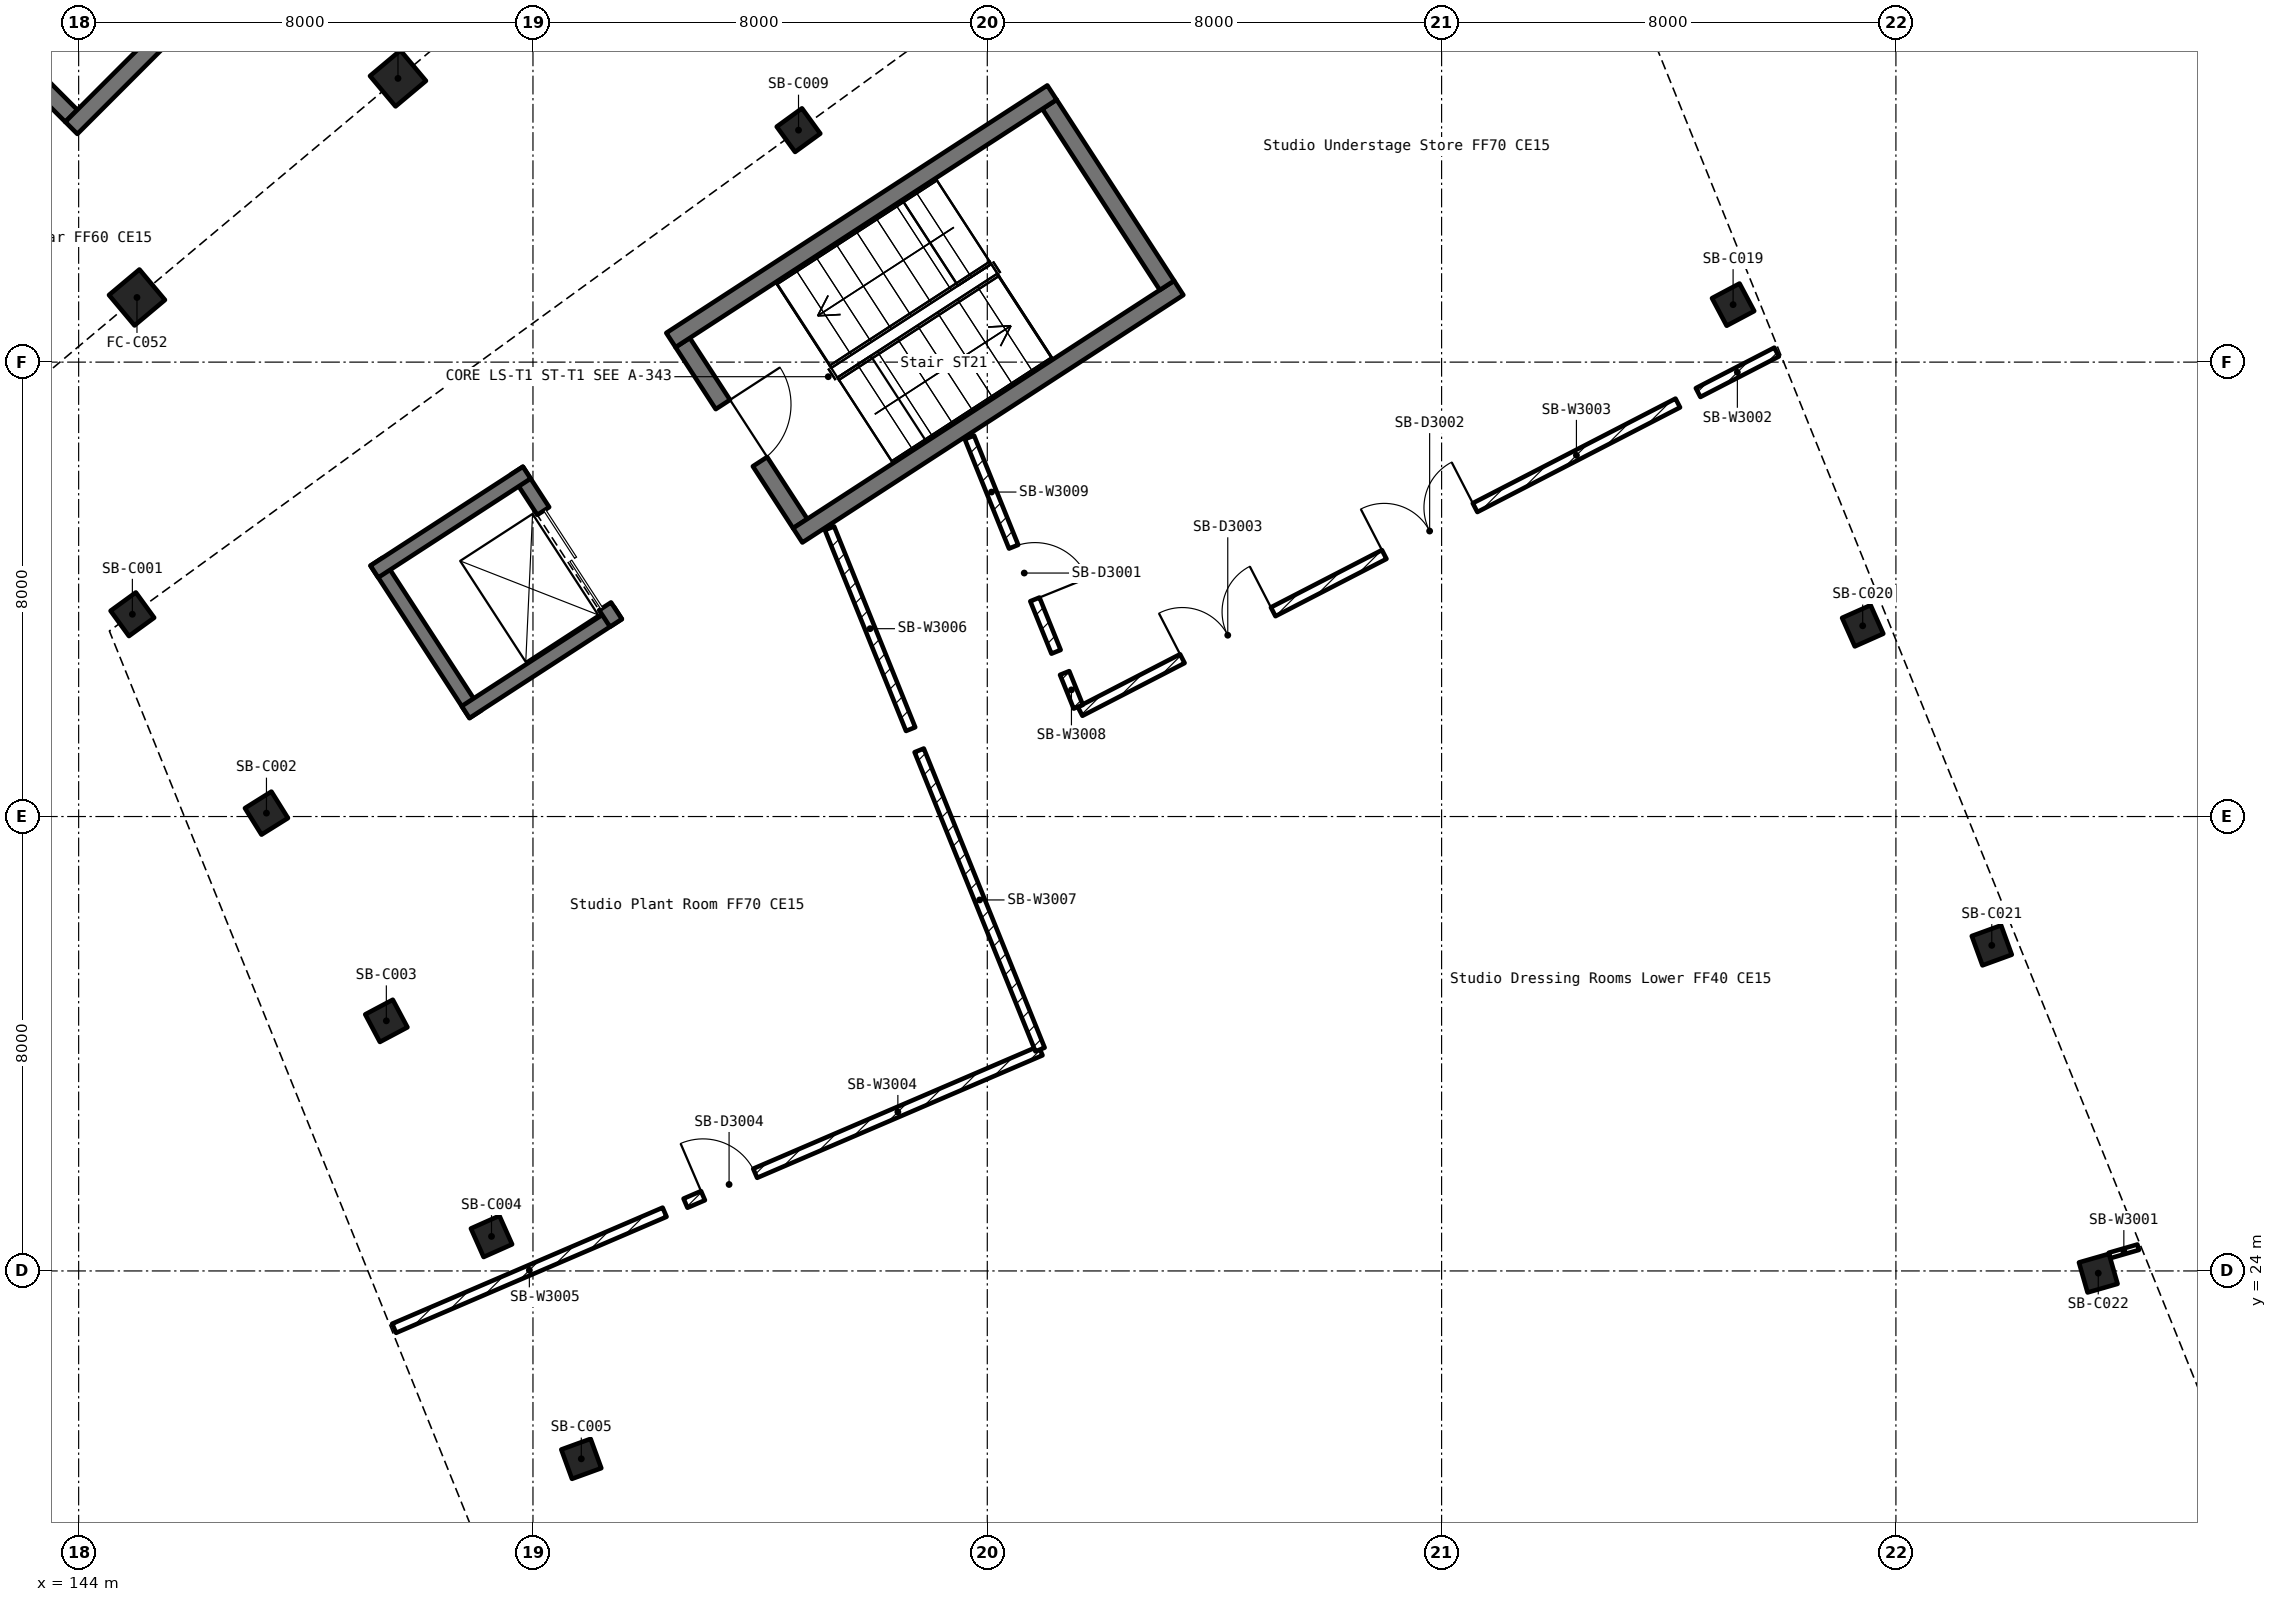
"""IFC4 building model, lengths in metres.
Left out: names, types, materials, properties, quantities, classifications, styles, units other than length and angle.
Written with IfcOpenShell. Run it as: python <this file> out.ifc"""

import sys

from ifc_helpers import new_model, si_unit, direction, frame, frame_2d, origin, origin_2d, place, context, subcontext, project, spatial, rectangle, extrude, element, fill, save


model = new_model("IFC4")
c1 = context("Model", 3, precision=1e-05, world=origin(), true_north=direction((0.0, 1.0)))
c2 = subcontext(c1, "Body", "Model", "MODEL_VIEW")
j1 = project(units=[si_unit("LENGTHUNIT", "METRE"), si_unit("PLANEANGLEUNIT", "RADIAN")], contexts=[c1])
p1 = place(None, origin())
s1 = spatial("IfcSite", under=j1, at=p1, CompositionType="ELEMENT")
p2 = place(p1, origin())
s2 = spatial("IfcBuilding", under=s1, at=p2, CompositionType="ELEMENT")
p3 = place(p2, frame((0.0, 0.0, -6.0)))
s3 = spatial("IfcBuildingStorey", under=s2, at=p3, CompositionType="ELEMENT", Elevation=-6.0)
for number, where, z_axis, x_axis in (
    (1, (145.027, 41.138, 0.0), (0.0, 0.0, 1.0), (0.643, -0.766, 0.0)),
    (2, (149.623, 44.995, 0.0), (0.0, 0.0, 1.0), (0.643, -0.766, 0.0)),
):
    element("IfcColumn", number, at=place(p3, frame(where, z_axis=z_axis, x_axis=x_axis)), inside=s3, PredefinedType="COLUMN", context=c2, shape_type="SweptSolid", body=[
        extrude(rectangle(XDim=0.7, YDim=0.7, at=origin_2d()), origin(), (0.0, 0.0, 1.0), 6.0),
    ])
for number, where, z_axis, x_axis in (
    (3, (144.946, 35.561, 0.0), (0.0, 0.0, 1.0), (0.588, -0.809, 0.0)),
    (4, (147.307, 32.06, 0.0), (0.0, 0.0, 1.0), (0.53, -0.848, 0.0)),
    (5, (149.418, 28.403, 0.0), (0.0, 0.0, 1.0), (0.469, -0.883, 0.0)),
    (6, (151.27, 24.608, 0.0), (0.0, 0.0, 1.0), (0.407, -0.914, 0.0)),
    (7, (152.851, 20.692, 0.0), (0.0, 0.0, 1.0), (0.342, -0.94, 0.0)),
    (8, (156.676, 44.084, 0.0), (0.0, 0.0, 1.0), (0.588, -0.809, 0.0)),
    (9, (173.133, 41.012, 0.0), (0.0, 0.0, 1.0), (0.469, -0.883, 0.0)),
    (10, (175.415, 35.358, 0.0), (0.0, 0.0, 1.0), (0.407, -0.914, 0.0)),
    (11, (177.688, 29.732, 0.0), (0.0, 0.0, 1.0), (0.342, -0.94, 0.0)),
    (12, (179.563, 23.961, 0.0), (0.0, 0.0, 1.0), (0.276, -0.961, 0.0)),
):
    element("IfcColumn", number, at=place(p3, frame(where, z_axis=z_axis, x_axis=x_axis)), inside=s3, PredefinedType="COLUMN", context=c2, shape_type="SweptSolid", body=[
        extrude(rectangle(XDim=0.55, YDim=0.55, at=origin_2d()), origin(), (0.0, 0.0, 1.0), 6.0),
    ])
p4 = place(p2, origin())
s4 = spatial("IfcBuildingStorey", under=s2, at=p4, CompositionType="ELEMENT", Elevation=0.0)
p5 = place(p4, frame((171.933, 40.375, -6.3), z_axis=(0.0, 0.0, 1.0), x_axis=(-0.882926128241, -0.469511929634, 0.0)))
e13 = element("IfcWall", 13, at=p5, inside=s4, PredefinedType="SHEAR", context=c2, shape_type="SweptSolid", body=[
    extrude(rectangle(XDim=22.0, YDim=0.4, at=frame_2d((11.0, 0.0))), origin(), (0.0, 0.0, 1.0), 12.3),
])
p6 = place(p4, frame((152.509, 30.046, -6.3), z_axis=(0.0, 0.0, 1.0), x_axis=(0.374613299166, -0.92718114524, 0.0)))
e14 = element("IfcWall", 14, at=p6, inside=s4, PredefinedType="SHEAR", context=c2, shape_type="SweptSolid", body=[
    extrude(rectangle(XDim=13.379, YDim=0.4, at=frame_2d((6.689, 0.0))), origin(), (0.0, 0.0, 1.0), 12.3),
])
p7 = place(p6, frame((6.191, 0.0, 6.3)))
e15 = element("IfcOpeningElement", 15, at=p7, cuts=e14, PredefinedType="OPENING", context=c2, shape_type="SweptSolid", body=[
    extrude(rectangle(XDim=1.0, YDim=2.1, at=frame_2d((0.5, 1.05))), frame((0.0, 0.212, 0.0), z_axis=(0.0, -1.0, 0.0), x_axis=(1.0, 0.0, 0.0)), (0.0, 0.0, 1.0), 0.424),
])
p8 = place(p4, frame((157.521, 17.641, -6.3), z_axis=(0.0, 0.0, 1.0), x_axis=(0.961263044958, 0.275632651182, 0.0)))
e16 = element("IfcWall", 16, at=p8, inside=s4, PredefinedType="SHEAR", context=c2, shape_type="SweptSolid", body=[
    extrude(rectangle(XDim=22.0, YDim=0.4, at=frame_2d((11.0, 0.0))), origin(), (0.0, 0.0, 1.0), 12.3),
])
p9 = place(p8, frame((8.531, 0.0, 6.3)))
e17 = element("IfcOpeningElement", 17, at=p9, cuts=e16, PredefinedType="OPENING", context=c2, shape_type="SweptSolid", body=[
    extrude(rectangle(XDim=0.9, YDim=2.1, at=frame_2d((0.45, 1.05))), frame((0.0, 0.212, 0.0), z_axis=(0.0, -1.0, 0.0), x_axis=(1.0, 0.0, 0.0)), (0.0, 0.0, 1.0), 0.424),
])
p10 = place(p4, frame((178.669, 23.705, -6.3), z_axis=(0.0, 0.0, 1.0), x_axis=(-0.374642655757, 0.92716928362, 0.0)))
e18 = element("IfcWall", 18, at=p10, inside=s4, PredefinedType="SHEAR", context=c2, shape_type="SweptSolid", body=[
    extrude(rectangle(XDim=17.979, YDim=0.4, at=frame_2d((8.99, 0.0))), origin(), (0.0, 0.0, 1.0), 12.3),
])
p11 = place(p10, frame((8.09, 0.0, 6.3)))
e19 = element("IfcOpeningElement", 19, at=p11, cuts=e18, PredefinedType="OPENING", context=c2, shape_type="SweptSolid", body=[
    extrude(rectangle(XDim=1.8, YDim=2.1, at=frame_2d((0.9, 1.05))), frame((0.0, 0.212, 0.0), z_axis=(0.0, -1.0, 0.0), x_axis=(1.0, 0.0, 0.0)), (0.0, 0.0, 1.0), 0.424),
])
p12 = place(p10, frame((12.59, 0.0, 6.3)))
e20 = element("IfcOpeningElement", 20, at=p12, cuts=e18, PredefinedType="OPENING", context=c2, shape_type="SweptSolid", body=[
    extrude(rectangle(XDim=1.8, YDim=2.1, at=frame_2d((0.9, 1.05))), frame((0.0, 0.212, 0.0), z_axis=(0.0, -1.0, 0.0), x_axis=(1.0, 0.0, 0.0)), (0.0, 0.0, 1.0), 0.424),
])
p13 = place(p3, frame((154.636, 40.344, 0.0), z_axis=(0.0, 0.0, 1.0), x_axis=(0.544712834543, -0.838622637355, 0.0)))
e21 = element("IfcWall", 21, at=p13, inside=s3, PredefinedType="SOLIDWALL", context=c2, shape_type="SweptSolid", body=[
    extrude(rectangle(XDim=3.8, YDim=0.3, at=frame_2d((1.9, 0.0))), origin(), (0.0, 0.0, 1.0), 6.0),
])
p14 = place(p13, frame((1.3, 0.0, 0.0)))
e22 = element("IfcOpeningElement", 22, at=p14, cuts=e21, PredefinedType="OPENING", context=c2, shape_type="SweptSolid", body=[
    extrude(rectangle(XDim=1.2, YDim=2.1, at=frame_2d((0.6, 1.05))), frame((0.0, 0.162, 0.0), z_axis=(0.0, -1.0, 0.0), x_axis=(1.0, 0.0, 0.0)), (0.0, 0.0, 1.0), 0.324),
])
p15 = place(p3, frame((156.662, 36.95, 0.0), z_axis=(0.0, 0.0, 1.0), x_axis=(0.838666673849, 0.544645031351, 0.0)))
e23 = element("IfcWall", 23, at=p15, inside=s3, PredefinedType="SOLIDWALL", context=c2, shape_type="SweptSolid", body=[
    extrude(rectangle(XDim=8.0, YDim=0.3, at=frame_2d((4.0, 0.0))), origin(), (0.0, 0.0, 1.0), 6.0),
])
p16 = place(p3, frame((163.164, 41.351, 0.0), z_axis=(0.0, 0.0, 1.0), x_axis=(-0.544414712312, 0.838816202167, 0.0)))
e24 = element("IfcWall", 24, at=p16, inside=s3, PredefinedType="SOLIDWALL", context=c2, shape_type="SweptSolid", body=[
    extrude(rectangle(XDim=3.801, YDim=0.3, at=frame_2d((1.9, 0.0))), origin(), (0.0, 0.0, 1.0), 6.0),
])
p17 = place(p3, frame((161.139, 44.746, 0.0), z_axis=(0.0, 0.0, 1.0), x_axis=(-0.838633189021, -0.544696589187, 0.0)))
e25 = element("IfcWall", 25, at=p17, inside=s3, PredefinedType="SOLIDWALL", context=c2, shape_type="SweptSolid", body=[
    extrude(rectangle(XDim=8.001, YDim=0.3, at=frame_2d((4.0, 0.0))), origin(), (0.0, 0.0, 1.0), 6.0),
])
p18 = place(p3, frame((140.335, 47.871, 0.0), z_axis=(0.0, 0.0, 1.0), x_axis=(0.707106781187, -0.707106781187, 0.0)))
e26 = element("IfcWall", 26, at=p18, inside=s3, PredefinedType="SOLIDWALL", context=c2, shape_type="SweptSolid", body=[
    extrude(rectangle(XDim=5.001, YDim=0.3, at=frame_2d((2.5, 0.0))), origin(), (0.0, 0.0, 1.0), 6.0),
])
p19 = place(p18, frame((1.9, 0.0, 0.0)))
e27 = element("IfcOpeningElement", 27, at=p19, cuts=e26, PredefinedType="OPENING", context=c2, shape_type="SweptSolid", body=[
    extrude(rectangle(XDim=1.2, YDim=2.1, at=frame_2d((0.6, 1.05))), frame((0.0, 0.162, 0.0), z_axis=(0.0, -1.0, 0.0), x_axis=(1.0, 0.0, 0.0)), (0.0, 0.0, 1.0), 0.324),
])
p20 = place(p3, frame((143.871, 44.123, 0.0), z_axis=(0.0, 0.0, 1.0), x_axis=(0.7070945738, 0.707118988363, 0.0)))
e28 = element("IfcWall", 28, at=p20, inside=s3, PredefinedType="SOLIDWALL", context=c2, shape_type="SweptSolid", body=[
    extrude(rectangle(XDim=10.0, YDim=0.3, at=frame_2d((5.0, 0.0))), origin(), (0.0, 0.0, 1.0), 6.0),
])
for number, where, z_axis, x_axis in (
    (29, (149.244, 36.485, 0.0), (0.0, 0.0, 1.0), (0.545, -0.839, 0.0)),
    (30, (150.814, 33.838, 0.0), (0.0, 0.0, 1.0), (0.839, 0.545, 0.0)),
):
    element("IfcWall", number, at=place(p3, frame(where, z_axis=z_axis, x_axis=x_axis)), inside=s3, PredefinedType="SOLIDWALL", context=c2, shape_type="SweptSolid", body=[
        extrude(rectangle(XDim=3.2, YDim=0.25, at=frame_2d((1.6, 0.0))), origin(), (0.0, 0.0, 1.0), 6.0),
    ])
p21 = place(p3, frame((153.461, 35.408, 0.0), z_axis=(0.0, 0.0, 1.0), x_axis=(-0.544746938909, 0.838600484467, 0.0)))
e31 = element("IfcWall", 31, at=p21, inside=s3, PredefinedType="SOLIDWALL", context=c2, shape_type="SweptSolid", body=[
    extrude(rectangle(XDim=3.199, YDim=0.25, at=frame_2d((1.6, 0.0))), origin(), (0.0, 0.0, 1.0), 6.0),
])
p22 = place(p21, frame((0.35, 0.0, 0.0)))
e32 = element("IfcOpeningElement", 32, at=p22, cuts=e31, PredefinedType="OPENING", context=c2, shape_type="SweptSolid", body=[
    extrude(rectangle(XDim=2.0, YDim=2.2, at=frame_2d((1.0, 1.1))), frame((0.0, 0.137, 0.0), z_axis=(0.0, -1.0, 0.0), x_axis=(1.0, 0.0, 0.0)), (0.0, 0.0, 1.0), 0.274),
])
p23 = place(p3, frame((151.891, 38.054, 0.0), z_axis=(0.0, 0.0, 1.0), x_axis=(-0.838830397361, -0.544392840201, 0.0)))
e33 = element("IfcWall", 33, at=p23, inside=s3, PredefinedType="SOLIDWALL", context=c2, shape_type="SweptSolid", body=[
    extrude(rectangle(XDim=3.2, YDim=0.25, at=frame_2d((1.6, 0.0))), origin(), (0.0, 0.0, 1.0), 6.0),
])
p24 = place(p3, frame((180.266, 24.418, 0.0), z_axis=(0.0, 0.0, 1.0), x_axis=(-0.960678409091, -0.277663455117, 0.0)))
e34 = element("IfcWall", 34, at=p24, inside=s3, PredefinedType="PARTITIONING", context=c2, shape_type="SweptSolid", body=[
    extrude(rectangle(XDim=0.526, YDim=0.1, at=frame_2d((0.263, 0.0))), origin(), (0.0, 0.0, 1.0), 4.88),
])
p25 = place(p3, frame((172.517, 39.464, 0.0), z_axis=(0.0, 0.0, 1.0), x_axis=(0.888703214067, 0.458482930225, 0.0)))
e35 = element("IfcWall", 35, at=p25, inside=s3, PredefinedType="PARTITIONING", context=c2, shape_type="SweptSolid", body=[
    extrude(rectangle(XDim=1.555, YDim=0.175, at=frame_2d((0.777, 0.0))), origin(), (0.0, 0.0, 1.0), 4.88),
])
p26 = place(p3, frame((161.635, 33.851, 0.0), z_axis=(0.0, 0.0, 1.0), x_axis=(0.888715235669, 0.458459627327, 0.0)))
e36 = element("IfcWall", 36, at=p26, inside=s3, PredefinedType="PARTITIONING", context=c2, shape_type="SweptSolid", body=[
    extrude(rectangle(XDim=11.842, YDim=0.175, at=frame_2d((5.921, 0.0))), origin(), (0.0, 0.0, 1.0), 4.88),
])
p27 = place(p26, frame((6.025, 0.0, 0.0)))
e37 = element("IfcOpeningElement", 37, at=p27, cuts=e36, PredefinedType="OPENING", context=c2, shape_type="SweptSolid", body=[
    extrude(rectangle(XDim=1.8, YDim=2.1, at=frame_2d((0.9, 1.05))), frame((0.0, 0.1, 0.0), z_axis=(0.0, -1.0, 0.0), x_axis=(1.0, 0.0, 0.0)), (0.0, 0.0, 1.0), 0.199),
])
p28 = place(p26, frame((2.025, 0.0, 0.0)))
e38 = element("IfcOpeningElement", 38, at=p28, cuts=e36, PredefinedType="OPENING", context=c2, shape_type="SweptSolid", body=[
    extrude(rectangle(XDim=1.8, YDim=2.1, at=frame_2d((0.9, 1.05))), frame((0.0, 0.1, 0.0), z_axis=(0.0, -1.0, 0.0), x_axis=(1.0, 0.0, 0.0)), (0.0, 0.0, 1.0), 0.199),
])
p29 = place(p3, frame((154.686, 25.193, 0.0), z_axis=(0.0, 0.0, 1.0), x_axis=(0.918961170443, 0.394348028038, 0.0)))
e39 = element("IfcWall", 39, at=p29, inside=s3, PredefinedType="PARTITIONING", context=c2, shape_type="SweptSolid", body=[
    extrude(rectangle(XDim=6.803, YDim=0.175, at=frame_2d((3.402, 0.0))), origin(), (0.0, 0.0, 1.0), 4.88),
])
p30 = place(p29, frame((0.335, 0.0, 0.0)))
e40 = element("IfcOpeningElement", 40, at=p30, cuts=e39, PredefinedType="OPENING", context=c2, shape_type="SweptSolid", body=[
    extrude(rectangle(XDim=1.0, YDim=2.1, at=frame_2d((0.5, 1.05))), frame((0.0, 0.1, 0.0), z_axis=(0.0, -1.0, 0.0), x_axis=(1.0, 0.0, 0.0)), (0.0, 0.0, 1.0), 0.199),
])
p31 = place(p3, frame((149.555, 22.99, 0.0), z_axis=(0.0, 0.0, 1.0), x_axis=(0.918964645879, 0.394339929026, 0.0)))
e41 = element("IfcWall", 41, at=p31, inside=s3, PredefinedType="PARTITIONING", context=c2, shape_type="SweptSolid", body=[
    extrude(rectangle(XDim=5.183, YDim=0.175, at=frame_2d((2.592, 0.0))), origin(), (0.0, 0.0, 1.0), 4.88),
])
p32 = place(p3, frame((158.65, 33.539, 0.0), z_axis=(0.0, 0.0, 1.0), x_axis=(-0.374468342404, 0.927239699612, 0.0)))
e42 = element("IfcWall", 42, at=p32, inside=s3, PredefinedType="PARTITIONING", context=c2, shape_type="SweptSolid", body=[
    extrude(rectangle(XDim=3.813, YDim=0.175, at=frame_2d((1.907, 0.0))), origin(), (0.0, 0.0, 1.0), 4.88),
])
p33 = place(p3, frame((160.929, 27.898, 0.0), z_axis=(0.0, 0.0, 1.0), x_axis=(-0.374589531725, 0.927190747755, 0.0)))
e43 = element("IfcWall", 43, at=p33, inside=s3, PredefinedType="PARTITIONING", context=c2, shape_type="SweptSolid", body=[
    extrude(rectangle(XDim=5.681, YDim=0.175, at=frame_2d((2.84, 0.0))), origin(), (0.0, 0.0, 1.0), 4.88),
])
p34 = place(p3, frame((161.362, 34.527, 0.0), z_axis=(0.0, 0.0, 1.0), x_axis=(0.374607966928, -0.927183299631, 0.0)))
e44 = element("IfcWall", 44, at=p34, inside=s3, PredefinedType="PARTITIONING", context=c2, shape_type="SweptSolid", body=[
    extrude(rectangle(XDim=0.641, YDim=0.175, at=frame_2d((0.32, 0.0))), origin(), (0.0, 0.0, 1.0), 4.88),
])
p35 = place(p3, frame((159.686, 38.675, 0.0), z_axis=(0.0, 0.0, 1.0), x_axis=(0.374531458348, -0.927214207563, 0.0)))
e45 = element("IfcWall", 45, at=p35, inside=s3, PredefinedType="PARTITIONING", context=c2, shape_type="SweptSolid", body=[
    extrude(rectangle(XDim=4.072, YDim=0.175, at=frame_2d((2.036, 0.0))), origin(), (0.0, 0.0, 1.0), 4.88),
])
p36 = place(p35, frame((2.076, 0.0, 0.0)))
e46 = element("IfcOpeningElement", 46, at=p36, cuts=e45, PredefinedType="OPENING", context=c2, shape_type="SweptSolid", body=[
    extrude(rectangle(XDim=1.0, YDim=2.1, at=frame_2d((0.5, 1.05))), frame((0.0, 0.1, 0.0), z_axis=(0.0, -1.0, 0.0), x_axis=(1.0, 0.0, 0.0)), (0.0, 0.0, 1.0), 0.199),
])
p37 = place(p14, origin())
e47 = element("IfcDoor", 47, at=p37, inside=s3, OperationType="SINGLE_SWING_LEFT", PredefinedType="DOOR", context=c2, shape_type="SweptSolid", body=[
    extrude(rectangle(XDim=1.2, YDim=2.1, at=frame_2d((0.6, 1.05))), frame((0.0, 0.025, 0.0), z_axis=(0.0, -1.0, 0.0), x_axis=(1.0, 0.0, 0.0)), (0.0, 0.0, 1.0), 0.05),
])
fill(e22, e47)
p38 = place(p22, origin())
e48 = element("IfcDoor", 48, at=p38, inside=s3, OperationType="DOUBLE_DOOR_SLIDING", PredefinedType="DOOR", context=c2, shape_type="SweptSolid", body=[
    extrude(rectangle(XDim=2.0, YDim=2.2, at=frame_2d((1.0, 1.1))), frame((0.0, 0.025, 0.0), z_axis=(0.0, -1.0, 0.0), x_axis=(1.0, 0.0, 0.0)), (0.0, 0.0, 1.0), 0.05),
])
fill(e32, e48)
p39 = place(p36, origin())
e49 = element("IfcDoor", 49, at=p39, inside=s3, OperationType="SINGLE_SWING_RIGHT", PredefinedType="DOOR", context=c2, shape_type="SweptSolid", body=[
    extrude(rectangle(XDim=1.0, YDim=2.1, at=frame_2d((0.5, 1.05))), frame((0.0, 0.025, 0.0), z_axis=(0.0, -1.0, 0.0), x_axis=(1.0, 0.0, 0.0)), (0.0, 0.0, 1.0), 0.05),
])
fill(e46, e49)
p40 = place(p27, origin())
e50 = element("IfcDoor", 50, at=p40, inside=s3, OperationType="DOUBLE_DOOR_SINGLE_SWING", PredefinedType="DOOR", context=c2, shape_type="SweptSolid", body=[
    extrude(rectangle(XDim=1.8, YDim=2.1, at=frame_2d((0.9, 1.05))), frame((0.0, 0.025, 0.0), z_axis=(0.0, -1.0, 0.0), x_axis=(1.0, 0.0, 0.0)), (0.0, 0.0, 1.0), 0.05),
])
fill(e37, e50)
p41 = place(p28, origin())
e51 = element("IfcDoor", 51, at=p41, inside=s3, OperationType="DOUBLE_DOOR_SINGLE_SWING", PredefinedType="DOOR", context=c2, shape_type="SweptSolid", body=[
    extrude(rectangle(XDim=1.8, YDim=2.1, at=frame_2d((0.9, 1.05))), frame((0.0, 0.025, 0.0), z_axis=(0.0, -1.0, 0.0), x_axis=(1.0, 0.0, 0.0)), (0.0, 0.0, 1.0), 0.05),
])
fill(e38, e51)
p42 = place(p30, origin())
e52 = element("IfcDoor", 52, at=p42, inside=s3, OperationType="SINGLE_SWING_LEFT", PredefinedType="DOOR", context=c2, shape_type="SweptSolid", body=[
    extrude(rectangle(XDim=1.0, YDim=2.1, at=frame_2d((0.5, 1.05))), frame((0.0, 0.025, 0.0), z_axis=(0.0, -1.0, 0.0), x_axis=(1.0, 0.0, 0.0)), (0.0, 0.0, 1.0), 0.05),
])
fill(e40, e52)
save(model, sys.argv[1])
